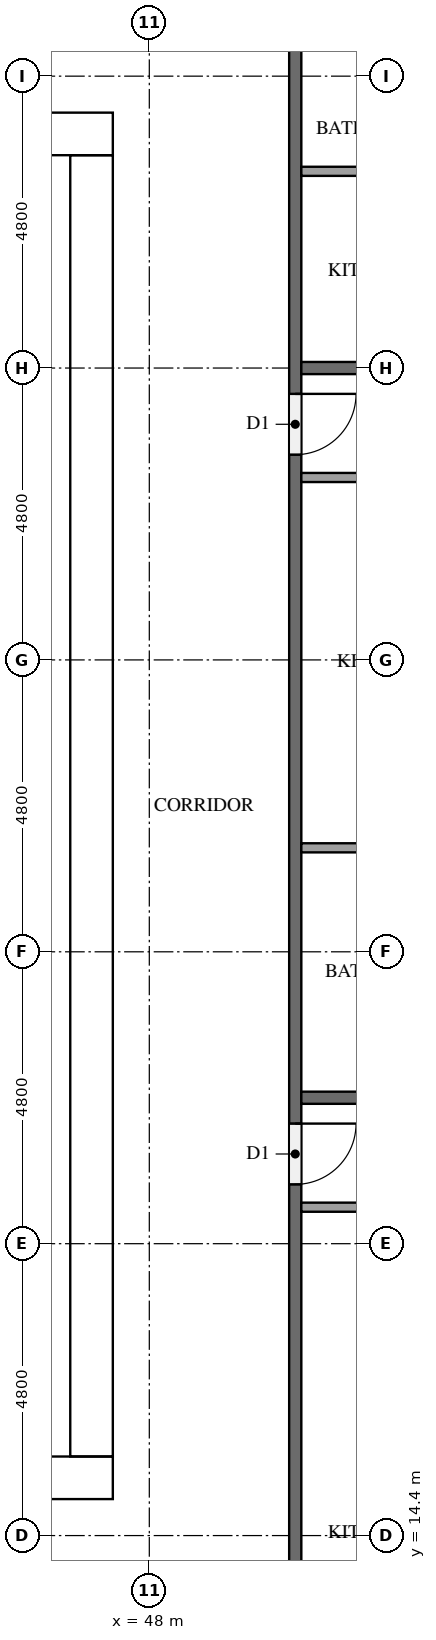
"""IFC4 building model, lengths in metres.
Left out: names, types, materials, properties, quantities, classifications, styles, units other than length and angle.
Written with IfcOpenShell. Run it as: python <this file> out.ifc"""

import sys

from ifc_helpers import new_model, si_unit, direction, frame, frame_2d, origin, place, context, subcontext, project, spatial, rectangle, extrude, element, fill, save


model = new_model("IFC4")
c1 = context("Model", 3, precision=1e-05, world=origin(), true_north=direction((0.0, 1.0)))
c2 = subcontext(c1, "Body", "Model", "MODEL_VIEW")
j1 = project(units=[si_unit("LENGTHUNIT", "METRE"), si_unit("PLANEANGLEUNIT", "RADIAN")], contexts=[c1])
p1 = place(None, origin())
s1 = spatial("IfcSite", under=j1, at=p1, CompositionType="ELEMENT")
p2 = place(p1, origin())
s2 = spatial("IfcBuilding", under=s1, at=p2, CompositionType="ELEMENT")
p3 = place(p2, frame((0.0, 0.0, 208.8)))
s3 = spatial("IfcBuildingStorey", under=s2, at=p3, CompositionType="ELEMENT", Elevation=208.8)
p4 = place(p3, frame((15.0, 15.35, 0.0), z_axis=(0.0, 0.0, 1.0), x_axis=(1.0, 0.0, 0.0)))
e1 = element("IfcWall", 1, at=p4, inside=s3, PredefinedType="SHEAR", context=c2, shape_type="SweptSolid", body=[
    extrude(rectangle(XDim=32.4, YDim=0.7, at=frame_2d((16.2, 0.0))), origin(), (0.0, 0.0, 1.0), 3.2),
])
p5 = place(p4, frame((15.3, 0.0, 0.0)))
e2 = element("IfcOpeningElement", 2, at=p5, cuts=e1, PredefinedType="OPENING", context=c2, shape_type="SweptSolid", body=[
    extrude(rectangle(XDim=1.8, YDim=2.1, at=frame_2d((0.9, 1.05))), frame((0.0, 0.36, 0.0), z_axis=(0.0, -1.0, 0.0), x_axis=(1.0, 0.0, 0.0)), (0.0, 0.0, 1.0), 0.72),
])
p6 = place(p3, frame((15.0, 37.45, 0.0), z_axis=(0.0, 0.0, 1.0), x_axis=(1.0, 0.0, 0.0)))
e3 = element("IfcWall", 3, at=p6, inside=s3, PredefinedType="SHEAR", context=c2, shape_type="SweptSolid", body=[
    extrude(rectangle(XDim=32.4, YDim=0.7, at=frame_2d((16.2, 0.0))), origin(), (0.0, 0.0, 1.0), 3.2),
])
p7 = place(p6, frame((15.3, 0.0, 0.0)))
e4 = element("IfcOpeningElement", 4, at=p7, cuts=e3, PredefinedType="OPENING", context=c2, shape_type="SweptSolid", body=[
    extrude(rectangle(XDim=1.8, YDim=2.1, at=frame_2d((0.9, 1.05))), frame((0.0, 0.36, 0.0), z_axis=(0.0, -1.0, 0.0), x_axis=(1.0, 0.0, 0.0)), (0.0, 0.0, 1.0), 0.72),
])
p8 = place(p6, frame((1.544, 0.0, 0.0)))
e5 = element("IfcOpeningElement", 5, at=p8, cuts=e3, PredefinedType="OPENING", context=c2, shape_type="SweptSolid", body=[
    extrude(rectangle(XDim=1.0, YDim=2.1, at=frame_2d((0.5, 1.05))), frame((0.0, 0.36, 0.0), z_axis=(0.0, -1.0, 0.0), x_axis=(1.0, 0.0, 0.0)), (0.0, 0.0, 1.0), 0.72),
])
p9 = place(p6, frame((5.219, 0.0, 0.0)))
e6 = element("IfcOpeningElement", 6, at=p9, cuts=e3, PredefinedType="OPENING", context=c2, shape_type="SweptSolid", body=[
    extrude(rectangle(XDim=1.0, YDim=2.1, at=frame_2d((0.5, 1.05))), frame((0.0, 0.36, 0.0), z_axis=(0.0, -1.0, 0.0), x_axis=(1.0, 0.0, 0.0)), (0.0, 0.0, 1.0), 0.72),
])
p10 = place(p3, frame((47.05, 15.7, 0.0), z_axis=(0.0, 0.0, 1.0), x_axis=(0.0, 1.0, 0.0)))
e7 = element("IfcWall", 7, at=p10, inside=s3, PredefinedType="SHEAR", context=c2, shape_type="SweptSolid", body=[
    extrude(rectangle(XDim=21.4, YDim=0.7, at=frame_2d((10.7, 0.0))), origin(), (0.0, 0.0, 1.0), 3.2),
])
p11 = place(p10, frame((10.4, 0.0, 0.0)))
e8 = element("IfcOpeningElement", 8, at=p11, cuts=e7, PredefinedType="OPENING", context=c2, shape_type="SweptSolid", body=[
    extrude(rectangle(XDim=1.2, YDim=2.1, at=frame_2d((0.6, 1.05))), frame((0.0, 0.36, 0.0), z_axis=(0.0, -1.0, 0.0), x_axis=(1.0, 0.0, 0.0)), (0.0, 0.0, 1.0), 0.72),
])
p12 = place(p3, frame((50.4, 40.7, 0.0), z_axis=(0.0, 0.0, 1.0), x_axis=(0.0, -1.0, 0.0)))
e9 = element("IfcWall", 9, at=p12, inside=s3, PredefinedType="PARTITIONING", context=c2, shape_type="SweptSolid", body=[
    extrude(rectangle(XDim=28.6, YDim=0.2, at=frame_2d((14.3, 0.0))), origin(), (0.0, 0.0, 1.0), 3.2),
])
p13 = place(p12, frame((19.525, 0.0, 0.0)))
e10 = element("IfcOpeningElement", 10, at=p13, cuts=e9, PredefinedType="OPENING", context=c2, shape_type="SweptSolid", body=[
    extrude(rectangle(XDim=1.0, YDim=2.1, at=frame_2d((0.5, 1.05))), frame((0.0, 0.11, 0.0), z_axis=(0.0, -1.0, 0.0), x_axis=(1.0, 0.0, 0.0)), (0.0, 0.0, 1.0), 0.22),
])
p14 = place(p12, frame((7.525, 0.0, 0.0)))
e11 = element("IfcOpeningElement", 11, at=p14, cuts=e9, PredefinedType="OPENING", context=c2, shape_type="SweptSolid", body=[
    extrude(rectangle(XDim=1.0, YDim=2.1, at=frame_2d((0.5, 1.05))), frame((0.0, 0.11, 0.0), z_axis=(0.0, -1.0, 0.0), x_axis=(1.0, 0.0, 0.0)), (0.0, 0.0, 1.0), 0.22),
])
p15 = place(p12, frame((0.325, 0.0, 0.0)))
e12 = element("IfcOpeningElement", 12, at=p15, cuts=e9, PredefinedType="OPENING", context=c2, shape_type="SweptSolid", body=[
    extrude(rectangle(XDim=1.0, YDim=2.1, at=frame_2d((0.5, 1.05))), frame((0.0, 0.11, 0.0), z_axis=(0.0, -1.0, 0.0), x_axis=(1.0, 0.0, 0.0)), (0.0, 0.0, 1.0), 0.22),
])
for number, where, z_axis, x_axis in (
    (13, (50.5, 21.6, 0.0), (0.0, 0.0, 1.0), (1.0, 0.0, 0.0)),
    (14, (50.5, 33.6, 0.0), (0.0, 0.0, 1.0), (1.0, 0.0, 0.0)),
):
    element("IfcWall", number, at=place(p3, frame(where, z_axis=z_axis, x_axis=x_axis)), inside=s3, PredefinedType="PARTITIONING", context=c2, shape_type="SweptSolid", body=[
        extrude(rectangle(XDim=11.8, YDim=0.2, at=frame_2d((5.9, 0.0))), origin(), (0.0, 0.0, 1.0), 3.2),
    ])
p16 = place(p3, frame((50.5, 19.8, 0.0), z_axis=(0.0, 0.0, 1.0), x_axis=(1.0, 0.0, 0.0)))
e15 = element("IfcWall", 15, at=p16, inside=s3, PredefinedType="PARTITIONING", context=c2, shape_type="SweptSolid", body=[
    extrude(rectangle(XDim=3.125, YDim=0.15, at=frame_2d((1.562, 0.0))), origin(), (0.0, 0.0, 1.0), 3.2),
])
p17 = place(p3, frame((50.5, 25.71, 0.0), z_axis=(0.0, 0.0, 1.0), x_axis=(1.0, 0.0, 0.0)))
e16 = element("IfcWall", 16, at=p17, inside=s3, PredefinedType="PARTITIONING", context=c2, shape_type="SweptSolid", body=[
    extrude(rectangle(XDim=3.275, YDim=0.15, at=frame_2d((1.637, 0.0))), origin(), (0.0, 0.0, 1.0), 3.2),
])
p18 = place(p3, frame((50.5, 31.8, 0.0), z_axis=(0.0, 0.0, 1.0), x_axis=(1.0, 0.0, 0.0)))
e17 = element("IfcWall", 17, at=p18, inside=s3, PredefinedType="PARTITIONING", context=c2, shape_type="SweptSolid", body=[
    extrude(rectangle(XDim=3.425, YDim=0.15, at=frame_2d((1.712, 0.0))), origin(), (0.0, 0.0, 1.0), 3.2),
])
p19 = place(p3, frame((50.5, 36.835, 0.0), z_axis=(0.0, 0.0, 1.0), x_axis=(1.0, 0.0, 0.0)))
e18 = element("IfcWall", 18, at=p19, inside=s3, PredefinedType="PARTITIONING", context=c2, shape_type="SweptSolid", body=[
    extrude(rectangle(XDim=2.975, YDim=0.15, at=frame_2d((1.488, 0.0))), origin(), (0.0, 0.0, 1.0), 3.2),
])
p20 = place(p11, origin())
e19 = element("IfcDoor", 19, at=p20, inside=s3, OperationType="SINGLE_SWING_RIGHT", PredefinedType="DOOR", context=c2, shape_type="SweptSolid", body=[
    extrude(rectangle(XDim=1.2, YDim=2.1, at=frame_2d((0.6, 1.05))), frame((0.0, 0.025, 0.0), z_axis=(0.0, -1.0, 0.0), x_axis=(1.0, 0.0, 0.0)), (0.0, 0.0, 1.0), 0.05),
])
fill(e8, e19)
p21 = place(p13, origin())
e20 = element("IfcDoor", 20, at=p21, inside=s3, OperationType="SINGLE_SWING_LEFT", PredefinedType="DOOR", context=c2, shape_type="SweptSolid", body=[
    extrude(rectangle(XDim=1.0, YDim=2.1, at=frame_2d((0.5, 1.05))), frame((0.0, 0.025, 0.0), z_axis=(0.0, -1.0, 0.0), x_axis=(1.0, 0.0, 0.0)), (0.0, 0.0, 1.0), 0.05),
])
fill(e10, e20)
p22 = place(p14, origin())
e21 = element("IfcDoor", 21, at=p22, inside=s3, OperationType="SINGLE_SWING_LEFT", PredefinedType="DOOR", context=c2, shape_type="SweptSolid", body=[
    extrude(rectangle(XDim=1.0, YDim=2.1, at=frame_2d((0.5, 1.05))), frame((0.0, 0.025, 0.0), z_axis=(0.0, -1.0, 0.0), x_axis=(1.0, 0.0, 0.0)), (0.0, 0.0, 1.0), 0.05),
])
fill(e11, e21)
save(model, sys.argv[1])
